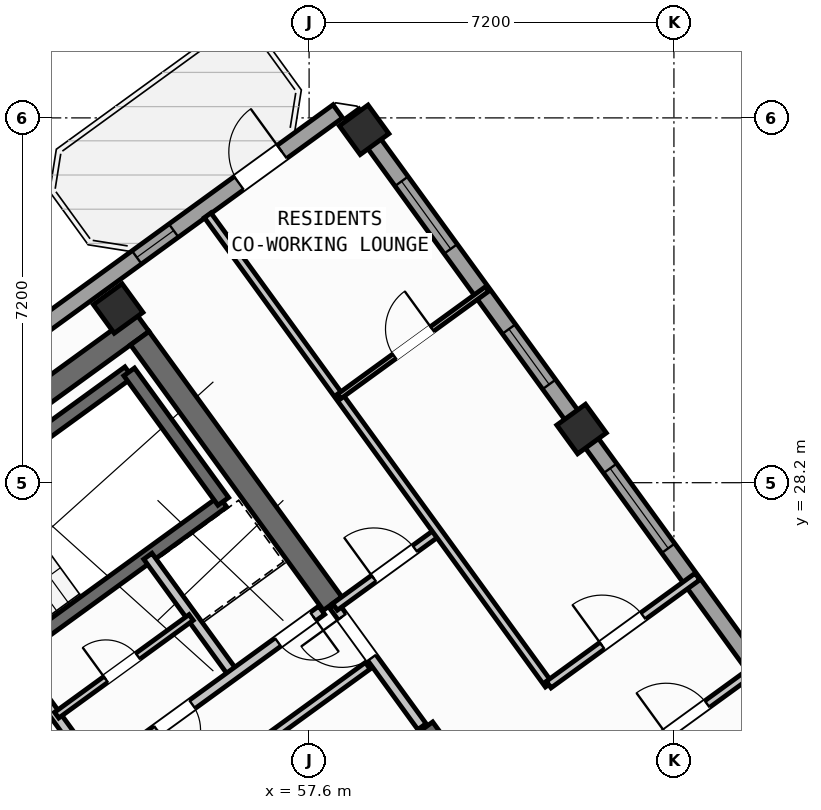
"""IFC4 building model, lengths in metres.
Left out: names, types, materials, properties, quantities, classifications, styles, units other than length and angle.
Written with IfcOpenShell. Run it as: python <this file> out.ifc"""

import sys

from ifc_helpers import new_model, si_unit, direction, frame, frame_2d, origin, origin_2d, place, context, subcontext, project, spatial, rectangle, hollow_rectangle, extrude, source, transform, mapped, element, fill, save


model = new_model("IFC4")
c1 = context("Model", 3, precision=1e-05, world=origin(), true_north=direction((0.0, 1.0)))
c2 = subcontext(c1, "Body", "Model", "MODEL_VIEW")
j1 = project(units=[si_unit("LENGTHUNIT", "METRE"), si_unit("PLANEANGLEUNIT", "RADIAN")], contexts=[c1])
p1 = place(None, origin())
s1 = spatial("IfcSite", under=j1, at=p1, CompositionType="ELEMENT")
p2 = place(p1, origin())
s2 = spatial("IfcBuilding", under=s1, at=p2, CompositionType="ELEMENT")
p3 = place(p2, frame((0.0, 0.0, 251.1)))
s3 = spatial("IfcBuildingStorey", under=s2, at=p3, CompositionType="ELEMENT", Elevation=251.1)
p4 = place(p3, frame((44.406, 24.172, 0.0), z_axis=(0.0, 0.0, 1.0), x_axis=(0.809012867805, 0.587790931986, 0.0)))
e1 = element("IfcWall", 1, at=p4, inside=s3, PredefinedType="SHEAR", context=c2, shape_type="SweptSolid", body=[
    extrude(rectangle(XDim=12.24, YDim=0.45, at=frame_2d((6.12, 0.0))), origin(), (0.0, 0.0, 1.0), 3.32),
])
p5 = place(p3, frame((61.988, 20.413, 0.0), z_axis=(0.0, 0.0, 1.0), x_axis=(-0.587819244441, 0.808992296542, 0.0)))
e2 = element("IfcWall", 2, at=p5, inside=s3, PredefinedType="SHEAR", context=c2, shape_type="SweptSolid", body=[
    extrude(rectangle(XDim=3.625, YDim=0.45, at=frame_2d((1.812, 0.0))), origin(), (0.0, 0.0, 1.0), 3.32),
])
p6 = place(p3, frame((58.064, 25.813, 0.0), z_axis=(0.0, 0.0, 1.0), x_axis=(-0.587774812919, 0.809024578921, 0.0)))
e3 = element("IfcWall", 3, at=p6, inside=s3, PredefinedType="SHEAR", context=c2, shape_type="SweptSolid", body=[
    extrude(rectangle(XDim=6.475, YDim=0.45, at=frame_2d((3.238, 0.0))), origin(), (0.0, 0.0, 1.0), 3.32),
])
m1 = source(origin(), c2, "Body", "SweptSolid", [
    extrude(hollow_rectangle(XDim=0.7, YDim=0.7, WallThickness=0.028, at=origin_2d()), origin(), (0.0, 0.0, 1.0), 3.6),
])
for number, where, z_axis, x_axis in (
    (4, (53.832, 31.638, 0.0), (0.0, 0.0, 1.0), (0.809, 0.588, 0.0)),
    (5, (62.977, 29.259, 0.0), (0.0, 0.0, 1.0), (0.809, 0.588, 0.0)),
    (6, (58.686, 35.165, 0.0), (0.0, 0.0, 1.0), (0.809, 0.588, 0.0)),
):
    element("IfcColumn", number, at=place(p3, frame(where, z_axis=z_axis, x_axis=x_axis)), inside=s3, PredefinedType="COLUMN", context=c2, shape_type="MappedRepresentation", body=[
        mapped(m1, transform((0.0, 0.0, 0.0), scale=1.0)),
    ])
p7 = place(p3, frame((43.938, 25.192, 0.0), z_axis=(0.0, 0.0, 1.0), x_axis=(0.809016324578, 0.587786174187, 0.0)))
e7 = element("IfcWall", 7, at=p7, inside=s3, PredefinedType="STANDARD", context=c2, shape_type="SweptSolid", body=[
    extrude(rectangle(XDim=17.587, YDim=0.32, at=frame_2d((8.794, 0.0))), origin(), (0.0, 0.0, 1.0), 3.32),
])
p8 = place(p7, frame((15.176, 0.0, 0.0)))
e8 = element("IfcOpeningElement", 8, at=p8, cuts=e7, PredefinedType="OPENING", context=c2, shape_type="SweptSolid", body=[
    extrude(rectangle(XDim=1.05, YDim=2.15, at=frame_2d((0.525, 1.075))), frame((0.0, 0.17, 0.0), z_axis=(0.0, -1.0, 0.0), x_axis=(1.0, 0.0, 0.0)), (0.0, 0.0, 1.0), 0.34),
])
p9 = place(p7, frame((2.522, 0.0, 0.9)))
e9 = element("IfcOpeningElement", 9, at=p9, cuts=e7, PredefinedType="OPENING", context=c2, shape_type="SweptSolid", body=[
    extrude(rectangle(XDim=1.65, YDim=1.45, at=frame_2d((0.825, 0.725))), frame((0.0, 0.17, 0.0), z_axis=(0.0, -1.0, 0.0), x_axis=(1.0, 0.0, 0.0)), (0.0, 0.0, 1.0), 0.34),
])
p10 = place(p7, frame((7.687, 0.0, 0.9)))
e10 = element("IfcOpeningElement", 10, at=p10, cuts=e7, PredefinedType="OPENING", context=c2, shape_type="SweptSolid", body=[
    extrude(rectangle(XDim=1.65, YDim=1.45, at=frame_2d((0.825, 0.725))), frame((0.0, 0.17, 0.0), z_axis=(0.0, -1.0, 0.0), x_axis=(1.0, 0.0, 0.0)), (0.0, 0.0, 1.0), 0.34),
])
p11 = place(p7, frame((12.684, 0.0, 1.0)))
e11 = element("IfcOpeningElement", 11, at=p11, cuts=e7, PredefinedType="OPENING", context=c2, shape_type="SweptSolid", body=[
    extrude(rectangle(XDim=0.9, YDim=1.25, at=frame_2d((0.45, 0.625))), frame((0.0, 0.17, 0.0), z_axis=(0.0, -1.0, 0.0), x_axis=(1.0, 0.0, 0.0)), (0.0, 0.0, 1.0), 0.34),
])
p12 = place(p3, frame((58.455, 35.484, 0.0), z_axis=(0.0, 0.0, 1.0), x_axis=(0.587783625747, -0.809018176127, 0.0)))
e12 = element("IfcWall", 12, at=p12, inside=s3, PredefinedType="STANDARD", context=c2, shape_type="SweptSolid", body=[
    extrude(rectangle(XDim=21.587, YDim=0.32, at=frame_2d((10.794, 0.0))), origin(), (0.0, 0.0, 1.0), 2.845),
])
p13 = place(p12, frame((1.65, 0.0, 0.9)))
e13 = element("IfcOpeningElement", 13, at=p13, cuts=e12, PredefinedType="OPENING", context=c2, shape_type="SweptSolid", body=[
    extrude(rectangle(XDim=1.65, YDim=1.45, at=frame_2d((0.825, 0.725))), frame((0.0, 0.17, 0.0), z_axis=(0.0, -1.0, 0.0), x_axis=(1.0, 0.0, 0.0)), (0.0, 0.0, 1.0), 0.34),
])
p14 = place(p12, frame((5.255, 0.0, 0.9)))
e14 = element("IfcOpeningElement", 14, at=p14, cuts=e12, PredefinedType="OPENING", context=c2, shape_type="SweptSolid", body=[
    extrude(rectangle(XDim=1.35, YDim=1.45, at=frame_2d((0.675, 0.725))), frame((0.0, 0.17, 0.0), z_axis=(0.0, -1.0, 0.0), x_axis=(1.0, 0.0, 0.0)), (0.0, 0.0, 1.0), 0.34),
])
p15 = place(p12, frame((8.654, 0.0, 0.95)))
e15 = element("IfcOpeningElement", 15, at=p15, cuts=e12, PredefinedType="OPENING", context=c2, shape_type="SweptSolid", body=[
    extrude(rectangle(XDim=1.95, YDim=1.35, at=frame_2d((0.975, 0.675))), frame((0.0, 0.17, 0.0), z_axis=(0.0, -1.0, 0.0), x_axis=(1.0, 0.0, 0.0)), (0.0, 0.0, 1.0), 0.34),
])
p16 = place(p3, frame((48.006, 25.996, 0.0), z_axis=(0.0, 0.0, 1.0), x_axis=(0.80901903764, 0.587782439969, 0.0)))
e16 = element("IfcWall", 16, at=p16, inside=s3, PredefinedType="SHEAR", context=c2, shape_type="SweptSolid", body=[
    extrude(rectangle(XDim=7.46, YDim=0.26, at=frame_2d((3.73, 0.0))), origin(), (0.0, 0.0, 1.0), 3.32),
])
p17 = place(p3, frame((49.863, 23.44, 0.0), z_axis=(0.0, 0.0, 1.0), x_axis=(0.809003474932, 0.587803859759, 0.0)))
e17 = element("IfcWall", 17, at=p17, inside=s3, PredefinedType="SHEAR", context=c2, shape_type="SweptSolid", body=[
    extrude(rectangle(XDim=7.46, YDim=0.26, at=frame_2d((3.73, 0.0))), origin(), (0.0, 0.0, 1.0), 3.32),
])
p18 = place(p17, frame((0.36, 0.0, 0.0)))
e18 = element("IfcOpeningElement", 18, at=p18, cuts=e17, PredefinedType="OPENING", context=c2, shape_type="SweptSolid", body=[
    extrude(rectangle(XDim=0.86, YDim=2.05, at=frame_2d((0.43, 1.025))), frame((0.0, 0.14, 0.0), z_axis=(0.0, -1.0, 0.0), x_axis=(1.0, 0.0, 0.0)), (0.0, 0.0, 1.0), 0.28),
])
p19 = place(p3, frame((55.906, 27.831, 0.0), z_axis=(0.0, 0.0, 1.0), x_axis=(-0.587804123638, 0.809003283204, 0.0)))
e19 = element("IfcWall", 19, at=p19, inside=s3, PredefinedType="SHEAR", context=c2, shape_type="SweptSolid", body=[
    extrude(rectangle(XDim=3.16, YDim=0.26, at=frame_2d((1.58, 0.0))), origin(), (0.0, 0.0, 1.0), 3.32),
])
p20 = place(p3, frame((54.421, 21.436, 0.0), z_axis=(0.0, 0.0, 1.0), x_axis=(0.809013710463, 0.587789772183, 0.0)))
e20 = element("IfcWall", 20, at=p20, inside=s3, PredefinedType="PARTITIONING", context=c2, shape_type="SweptSolid", body=[
    extrude(rectangle(XDim=5.36, YDim=0.16, at=frame_2d((2.68, 0.0))), origin(), (0.0, 0.0, 1.0), 3.31),
])
p21 = place(p20, frame((1.4, 0.0, 0.0)))
e21 = element("IfcOpeningElement", 21, at=p21, cuts=e20, PredefinedType="OPENING", context=c2, shape_type="SweptSolid", body=[
    extrude(rectangle(XDim=0.86, YDim=2.05, at=frame_2d((0.43, 1.025))), frame((0.0, 0.09, 0.0), z_axis=(0.0, -1.0, 0.0), x_axis=(1.0, 0.0, 0.0)), (0.0, 0.0, 1.0), 0.18),
])
p22 = place(p3, frame((53.425, 22.468, 0.0), z_axis=(0.0, 0.0, 1.0), x_axis=(-0.5877230039, 0.809062216821, 0.0)))
e22 = element("IfcWall", 22, at=p22, inside=s3, PredefinedType="STANDARD", context=c2, shape_type="SweptSolid", body=[
    extrude(rectangle(XDim=2.88, YDim=0.2, at=frame_2d((1.44, 0.0))), origin(), (0.0, 0.0, 1.0), 3.31),
])
p23 = place(p3, frame((56.111, 24.419, 0.0), z_axis=(0.0, 0.0, 1.0), x_axis=(-0.58777848983, 0.809021907548, 0.0)))
e23 = element("IfcWall", 23, at=p23, inside=s3, PredefinedType="STANDARD", context=c2, shape_type="SweptSolid", body=[
    extrude(rectangle(XDim=2.88, YDim=0.2, at=frame_2d((1.44, 0.0))), origin(), (0.0, 0.0, 1.0), 3.31),
])
p24 = place(p3, frame((53.425, 22.468, 0.0), z_axis=(0.0, 0.0, 1.0), x_axis=(0.809015945709, 0.587786695655, 0.0)))
e24 = element("IfcWall", 24, at=p24, inside=s3, PredefinedType="STANDARD", context=c2, shape_type="SweptSolid", body=[
    extrude(rectangle(XDim=5.468, YDim=0.2, at=frame_2d((2.734, 0.0))), origin(), (0.0, 0.0, 1.0), 3.31),
])
p25 = place(p24, frame((4.4, 0.0, 0.0)))
e25 = element("IfcOpeningElement", 25, at=p25, cuts=e24, PredefinedType="OPENING", context=c2, shape_type="SweptSolid", body=[
    extrude(rectangle(XDim=0.86, YDim=2.05, at=frame_2d((0.43, 1.025))), frame((0.0, 0.11, 0.0), z_axis=(0.0, -1.0, 0.0), x_axis=(1.0, 0.0, 0.0)), (0.0, 0.0, 1.0), 0.22),
])
p26 = place(p24, frame((1.45, 0.0, 0.0)))
e26 = element("IfcOpeningElement", 26, at=p26, cuts=e24, PredefinedType="OPENING", context=c2, shape_type="SweptSolid", body=[
    extrude(rectangle(XDim=0.86, YDim=2.05, at=frame_2d((0.43, 1.025))), frame((0.0, 0.11, 0.0), z_axis=(0.0, -1.0, 0.0), x_axis=(1.0, 0.0, 0.0)), (0.0, 0.0, 1.0), 0.22),
])
p27 = place(p3, frame((52.618, 23.612, 0.0), z_axis=(0.0, 0.0, 1.0), x_axis=(0.809009587469, 0.587795446889, 0.0)))
e27 = element("IfcWall", 27, at=p27, inside=s3, PredefinedType="PLUMBINGWALL", context=c2, shape_type="SweptSolid", body=[
    extrude(rectangle(XDim=3.28, YDim=0.14, at=frame_2d((1.64, 0.0))), origin(), (0.0, 0.0, 1.0), 3.31),
])
p28 = place(p27, frame((1.2, 0.0, 0.0)))
e28 = element("IfcOpeningElement", 28, at=p28, cuts=e27, PredefinedType="OPENING", context=c2, shape_type="SweptSolid", body=[
    extrude(rectangle(XDim=0.78, YDim=2.05, at=frame_2d((0.39, 1.025))), frame((0.0, 0.08, 0.0), z_axis=(0.0, -1.0, 0.0), x_axis=(1.0, 0.0, 0.0)), (0.0, 0.0, 1.0), 0.16),
])
p29 = place(p3, frame((59.827, 23.386, 0.0), z_axis=(0.0, 0.0, 1.0), x_axis=(-0.587803840107, 0.809003489211, 0.0)))
e29 = element("IfcWall", 29, at=p29, inside=s3, PredefinedType="STANDARD", context=c2, shape_type="SweptSolid", body=[
    extrude(rectangle(XDim=2.96, YDim=0.2, at=frame_2d((1.48, 0.0))), origin(), (0.0, 0.0, 1.0), 3.31),
])
p30 = place(p29, frame((1.68, 0.0, 0.0)))
e30 = element("IfcOpeningElement", 30, at=p30, cuts=e29, PredefinedType="OPENING", context=c2, shape_type="SweptSolid", body=[
    extrude(rectangle(XDim=1.0, YDim=2.1, at=frame_2d((0.5, 1.05))), frame((0.0, 0.11, 0.0), z_axis=(0.0, -1.0, 0.0), x_axis=(1.0, 0.0, 0.0)), (0.0, 0.0, 1.0), 0.22),
])
p31 = place(p3, frame((58.111, 25.749, 0.0), z_axis=(0.0, 0.0, 1.0), x_axis=(0.809000999347, 0.58780726693, 0.0)))
e31 = element("IfcWall", 31, at=p31, inside=s3, PredefinedType="PARTITIONING", context=c2, shape_type="SweptSolid", body=[
    extrude(rectangle(XDim=2.51, YDim=0.16, at=frame_2d((1.255, 0.0))), origin(), (0.0, 0.0, 1.0), 2.845),
])
p32 = place(p31, frame((0.95, 0.0, 0.0)))
e32 = element("IfcOpeningElement", 32, at=p32, cuts=e31, PredefinedType="OPENING", context=c2, shape_type="SweptSolid", body=[
    extrude(rectangle(XDim=1.0, YDim=2.1, at=frame_2d((0.5, 1.05))), frame((0.0, 0.09, 0.0), z_axis=(0.0, -1.0, 0.0), x_axis=(1.0, 0.0, 0.0)), (0.0, 0.0, 1.0), 0.18),
])
p33 = place(p3, frame((62.328, 24.215, 0.0), z_axis=(0.0, 0.0, 1.0), x_axis=(-0.587778600963, 0.809021826807, 0.0)))
e33 = element("IfcWall", 33, at=p33, inside=s3, PredefinedType="PARTITIONING", context=c2, shape_type="SweptSolid", body=[
    extrude(rectangle(XDim=11.45, YDim=0.16, at=frame_2d((5.725, 0.0))), origin(), (0.0, 0.0, 1.0), 3.31),
])
p34 = place(p3, frame((63.592, 22.475, 0.0), z_axis=(0.0, 0.0, 1.0), x_axis=(0.809035546126, 0.58775971715, 0.0)))
e34 = element("IfcWall", 34, at=p34, inside=s3, PredefinedType="PARTITIONING", context=c2, shape_type="SweptSolid", body=[
    extrude(rectangle(XDim=3.63, YDim=0.16, at=frame_2d((1.815, 0.0))), origin(), (0.0, 0.0, 1.0), 3.31),
])
p35 = place(p34, frame((1.305, 0.0, 0.0)))
e35 = element("IfcOpeningElement", 35, at=p35, cuts=e34, PredefinedType="OPENING", context=c2, shape_type="SweptSolid", body=[
    extrude(rectangle(XDim=1.0, YDim=2.1, at=frame_2d((0.5, 1.05))), frame((0.0, 0.09, 0.0), z_axis=(0.0, -1.0, 0.0), x_axis=(1.0, 0.0, 0.0)), (0.0, 0.0, 1.0), 0.18),
])
p36 = place(p3, frame((62.328, 24.215, 0.0), z_axis=(0.0, 0.0, 1.0), x_axis=(0.809003564202, 0.587803736896, 0.0)))
e36 = element("IfcWall", 36, at=p36, inside=s3, PredefinedType="PARTITIONING", context=c2, shape_type="SweptSolid", body=[
    extrude(rectangle(XDim=3.63, YDim=0.16, at=frame_2d((1.815, 0.0))), origin(), (0.0, 0.0, 1.0), 3.31),
])
p37 = place(p36, frame((1.305, 0.0, 0.0)))
e37 = element("IfcOpeningElement", 37, at=p37, cuts=e36, PredefinedType="OPENING", context=c2, shape_type="SweptSolid", body=[
    extrude(rectangle(XDim=1.0, YDim=2.1, at=frame_2d((0.5, 1.05))), frame((0.0, 0.09, 0.0), z_axis=(0.0, -1.0, 0.0), x_axis=(1.0, 0.0, 0.0)), (0.0, 0.0, 1.0), 0.18),
])
p38 = place(p3, frame((58.195, 29.904, 0.0), z_axis=(0.0, 0.0, 1.0), x_axis=(0.809005039917, 0.58780170584, 0.0)))
e38 = element("IfcWall", 38, at=p38, inside=s3, PredefinedType="PARTITIONING", context=c2, shape_type="SweptSolid", body=[
    extrude(rectangle(XDim=3.61, YDim=0.11, at=frame_2d((1.805, 0.0))), origin(), (0.0, 0.0, 1.0), 3.31),
])
p39 = place(p38, frame((1.345, 0.0, 0.0)))
e39 = element("IfcOpeningElement", 39, at=p39, cuts=e38, PredefinedType="OPENING", context=c2, shape_type="SweptSolid", body=[
    extrude(rectangle(XDim=0.92, YDim=2.08, at=frame_2d((0.46, 1.04))), frame((0.0, 0.065, 0.0), z_axis=(0.0, -1.0, 0.0), x_axis=(1.0, 0.0, 0.0)), (0.0, 0.0, 1.0), 0.13),
])
m2 = source(origin(), c2, "Body", "SweptSolid", [
    extrude(rectangle(XDim=1.05, YDim=2.15, at=frame_2d((0.525, 1.075))), frame((0.0, 0.025, 0.0), z_axis=(0.0, -1.0, 0.0), x_axis=(1.0, 0.0, 0.0)), (0.0, 0.0, 1.0), 0.05),
])
p40 = place(p8, origin())
e40 = element("IfcDoor", 40, at=p40, inside=s3, OperationType="SINGLE_SWING_RIGHT", PredefinedType="DOOR", context=c2, shape_type="MappedRepresentation", body=[
    mapped(m2, transform((0.0, 0.0, 0.0), scale=1.0)),
])
fill(e8, e40)
m3 = source(origin(), c2, "Body", "SweptSolid", [
    extrude(rectangle(XDim=0.9, YDim=1.25, at=frame_2d((0.45, 0.625))), frame((0.0, 0.03, 0.0), z_axis=(0.0, -1.0, 0.0), x_axis=(1.0, 0.0, 0.0)), (0.0, 0.0, 1.0), 0.06),
])
p41 = place(p11, origin())
e41 = element("IfcWindow", 41, at=p41, inside=s3, PartitioningType="SINGLE_PANEL", PredefinedType="WINDOW", context=c2, shape_type="MappedRepresentation", body=[
    mapped(m3, transform((0.0, 0.0, 0.0), scale=1.0)),
])
fill(e11, e41)
m4 = source(origin(), c2, "Body", "SweptSolid", [
    extrude(rectangle(XDim=1.65, YDim=1.45, at=frame_2d((0.825, 0.725))), frame((0.0, 0.03, 0.0), z_axis=(0.0, -1.0, 0.0), x_axis=(1.0, 0.0, 0.0)), (0.0, 0.0, 1.0), 0.06),
])
p42 = place(p13, origin())
e42 = element("IfcWindow", 42, at=p42, inside=s3, PartitioningType="SINGLE_PANEL", PredefinedType="WINDOW", context=c2, shape_type="MappedRepresentation", body=[
    mapped(m4, transform((0.0, 0.0, 0.0), scale=1.0)),
])
fill(e13, e42)
m5 = source(origin(), c2, "Body", "SweptSolid", [
    extrude(rectangle(XDim=1.35, YDim=1.45, at=frame_2d((0.675, 0.725))), frame((0.0, 0.03, 0.0), z_axis=(0.0, -1.0, 0.0), x_axis=(1.0, 0.0, 0.0)), (0.0, 0.0, 1.0), 0.06),
])
p43 = place(p14, origin())
e43 = element("IfcWindow", 43, at=p43, inside=s3, PartitioningType="SINGLE_PANEL", PredefinedType="WINDOW", context=c2, shape_type="MappedRepresentation", body=[
    mapped(m5, transform((0.0, 0.0, 0.0), scale=1.0)),
])
fill(e14, e43)
m6 = source(origin(), c2, "Body", "SweptSolid", [
    extrude(rectangle(XDim=1.95, YDim=1.35, at=frame_2d((0.975, 0.675))), frame((0.0, 0.03, 0.0), z_axis=(0.0, -1.0, 0.0), x_axis=(1.0, 0.0, 0.0)), (0.0, 0.0, 1.0), 0.06),
])
p44 = place(p15, origin())
e44 = element("IfcWindow", 44, at=p44, inside=s3, PartitioningType="SINGLE_PANEL", PredefinedType="WINDOW", context=c2, shape_type="MappedRepresentation", body=[
    mapped(m6, transform((0.0, 0.0, 0.0), scale=1.0)),
])
fill(e15, e44)
m7 = source(origin(), c2, "Body", "SweptSolid", [
    extrude(rectangle(XDim=0.86, YDim=2.05, at=frame_2d((0.43, 1.025))), frame((0.0, 0.025, 0.0), z_axis=(0.0, -1.0, 0.0), x_axis=(1.0, 0.0, 0.0)), (0.0, 0.0, 1.0), 0.05),
])
p45 = place(p25, frame((0.86, 0.0, 0.0), z_axis=(0.0, 0.0, 1.0), x_axis=(-1.0, 0.0, 0.0)))
e45 = element("IfcDoor", 45, at=p45, inside=s3, OperationType="SINGLE_SWING_LEFT", PredefinedType="DOOR", context=c2, shape_type="MappedRepresentation", body=[
    mapped(m7, transform((0.0, 0.0, 0.0), scale=1.0)),
])
fill(e25, e45)
p46 = place(p26, frame((0.86, 0.0, 0.0), z_axis=(0.0, 0.0, 1.0), x_axis=(-1.0, 0.0, 0.0)))
e46 = element("IfcDoor", 46, at=p46, inside=s3, OperationType="SINGLE_SWING_RIGHT", PredefinedType="DOOR", context=c2, shape_type="MappedRepresentation", body=[
    mapped(m7, transform((0.0, 0.0, 0.0), scale=1.0)),
])
fill(e26, e46)
m8 = source(origin(), c2, "Body", "SweptSolid", [
    extrude(rectangle(XDim=0.78, YDim=2.05, at=frame_2d((0.39, 1.025))), frame((0.0, 0.025, 0.0), z_axis=(0.0, -1.0, 0.0), x_axis=(1.0, 0.0, 0.0)), (0.0, 0.0, 1.0), 0.05),
])
p47 = place(p28, origin())
e47 = element("IfcDoor", 47, at=p47, inside=s3, OperationType="SINGLE_SWING_LEFT", PredefinedType="DOOR", context=c2, shape_type="MappedRepresentation", body=[
    mapped(m8, transform((0.0, 0.0, 0.0), scale=1.0)),
])
fill(e28, e47)
m9 = source(origin(), c2, "Body", "SweptSolid", [
    extrude(rectangle(XDim=1.0, YDim=2.1, at=frame_2d((0.5, 1.05))), frame((0.0, 0.025, 0.0), z_axis=(0.0, -1.0, 0.0), x_axis=(1.0, 0.0, 0.0)), (0.0, 0.0, 1.0), 0.05),
])
p48 = place(p32, origin())
e48 = element("IfcDoor", 48, at=p48, inside=s3, OperationType="SINGLE_SWING_LEFT", PredefinedType="DOOR", context=c2, shape_type="MappedRepresentation", body=[
    mapped(m9, transform((0.0, 0.0, 0.0), scale=1.0)),
])
fill(e32, e48)
p49 = place(p30, origin())
e49 = element("IfcDoor", 49, at=p49, inside=s3, OperationType="SINGLE_SWING_RIGHT", PredefinedType="DOOR", context=c2, shape_type="MappedRepresentation", body=[
    mapped(m9, transform((0.0, 0.0, 0.0), scale=1.0)),
])
fill(e30, e49)
p50 = place(p37, origin())
e50 = element("IfcDoor", 50, at=p50, inside=s3, OperationType="SINGLE_SWING_LEFT", PredefinedType="DOOR", context=c2, shape_type="MappedRepresentation", body=[
    mapped(m9, transform((0.0, 0.0, 0.0), scale=1.0)),
])
fill(e37, e50)
m10 = source(origin(), c2, "Body", "SweptSolid", [
    extrude(rectangle(XDim=0.92, YDim=2.08, at=frame_2d((0.46, 1.04))), frame((0.0, 0.025, 0.0), z_axis=(0.0, -1.0, 0.0), x_axis=(1.0, 0.0, 0.0)), (0.0, 0.0, 1.0), 0.05),
])
p51 = place(p39, origin())
e51 = element("IfcDoor", 51, at=p51, inside=s3, OperationType="SINGLE_SWING_RIGHT", PredefinedType="DOOR", context=c2, shape_type="MappedRepresentation", body=[
    mapped(m10, transform((0.0, 0.0, 0.0), scale=1.0)),
])
fill(e39, e51)
p52 = place(p35, origin())
e52 = element("IfcDoor", 52, at=p52, inside=s3, OperationType="SINGLE_SWING_LEFT", PredefinedType="DOOR", context=c2, shape_type="MappedRepresentation", body=[
    mapped(m9, transform((0.0, 0.0, 0.0), scale=1.0)),
])
fill(e35, e52)
save(model, sys.argv[1])
